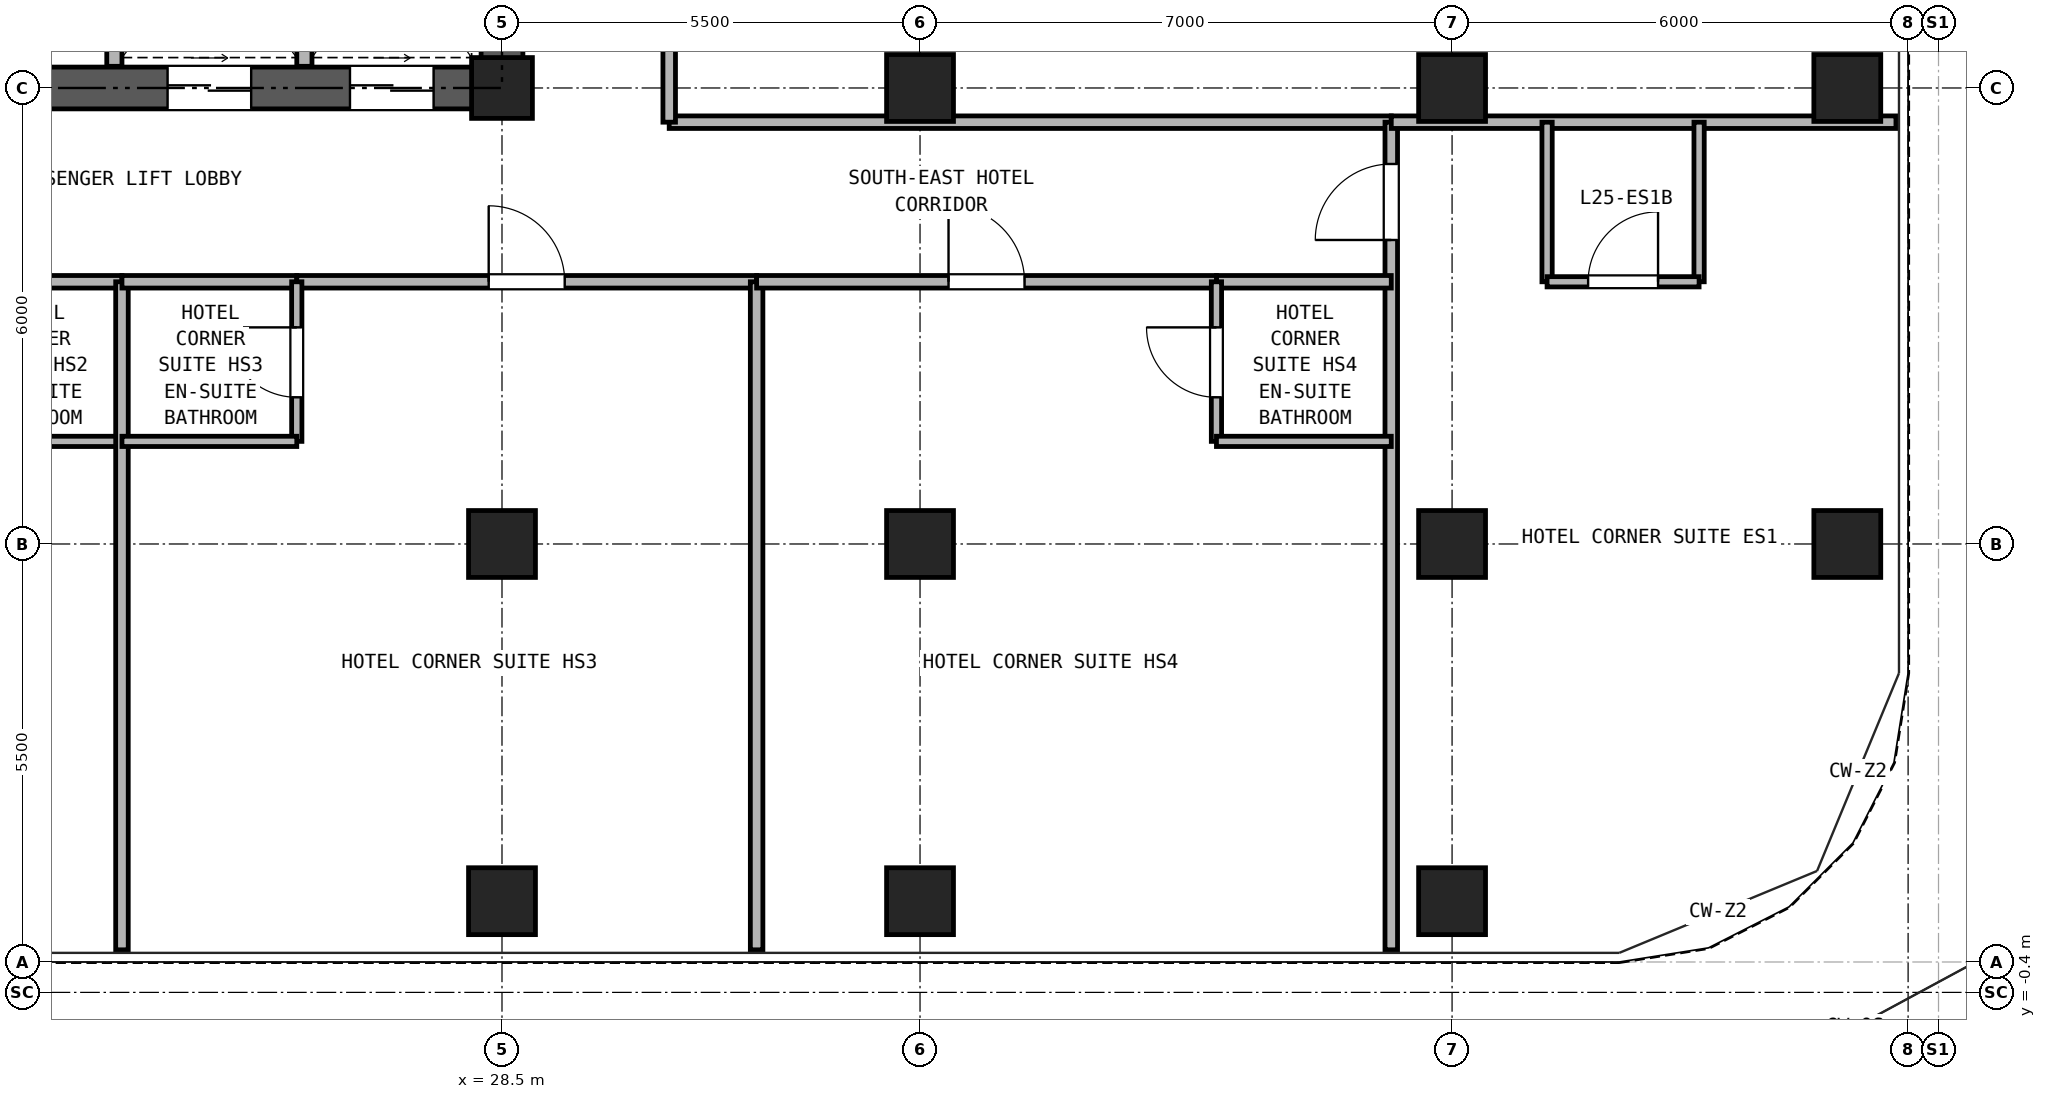
"""IFC4 building model, lengths in metres.
Left out: names, types, materials, properties, quantities, classifications, styles, units other than length and angle.
Written with IfcOpenShell. Run it as: python <this file> out.ifc"""

import sys

from ifc_helpers import new_model, si_unit, direction, frame, frame_2d, origin, origin_2d, place, context, subcontext, project, spatial, rectangle, hollow_rectangle, extrude, source, transform, mapped, element, fill, save


model = new_model("IFC4")
c1 = context("Model", 3, precision=1e-05, world=origin(), true_north=direction((0.0, 1.0)))
c2 = subcontext(c1, "Body", "Model", "MODEL_VIEW")
j1 = project(units=[si_unit("LENGTHUNIT", "METRE"), si_unit("PLANEANGLEUNIT", "RADIAN")], contexts=[c1])
p1 = place(None, origin())
s1 = spatial("IfcSite", under=j1, at=p1, CompositionType="ELEMENT")
p2 = place(p1, origin())
s2 = spatial("IfcBuilding", under=s1, at=p2, CompositionType="ELEMENT")
p3 = place(p2, frame((0.0, 0.0, 95.9)))
s3 = spatial("IfcBuildingStorey", under=s2, at=p3, CompositionType="ELEMENT", Elevation=95.9)
m1 = source(origin(), c2, "Body", "SweptSolid", [
    extrude(hollow_rectangle(XDim=0.88, YDim=0.88, WallThickness=0.05, at=origin_2d()), origin(), (0.0, 0.0, 1.0), 2.95),
])
for number, where, z_axis, x_axis in (
    (1, (28.5, 0.8, 0.0), (0.0, 0.0, 1.0), (1.0, 0.0, 0.0)),
    (2, (34.0, 0.8, 0.0), (0.0, 0.0, 1.0), (1.0, 0.0, 0.0)),
    (3, (41.0, 0.8, 0.0), (0.0, 0.0, 1.0), (1.0, 0.0, 0.0)),
    (4, (46.2, 5.5, 0.0), (0.0, 0.0, 1.0), (1.0, 0.0, 0.0)),
    (5, (46.2, 11.5, 0.0), (0.0, 0.0, 1.0), (1.0, 0.0, 0.0)),
    (6, (28.5, 5.5, 0.0), (0.0, 0.0, 1.0), (1.0, 0.0, 0.0)),
):
    element("IfcColumn", number, at=place(p3, frame(where, z_axis=z_axis, x_axis=x_axis)), inside=s3, PredefinedType="COLUMN", context=c2, shape_type="MappedRepresentation", body=[
        mapped(m1, transform((0.0, 0.0, 0.0), x_axis=(1.0, 0.0, 0.0), y_axis=(0.0, 1.0, 0.0), z_axis=(0.0, 0.0, 1.0), scale=1.0)),
    ])
m2 = source(origin(), c2, "Body", "SweptSolid", [
    extrude(hollow_rectangle(XDim=0.8, YDim=0.8, WallThickness=0.045, at=origin_2d()), origin(), (0.0, 0.0, 1.0), 2.95),
])
p4 = place(p3, frame((28.5, 11.5, 0.0), z_axis=(0.0, 0.0, 1.0), x_axis=(1.0, 0.0, 0.0)))
e7 = element("IfcColumn", 7, at=p4, inside=s3, PredefinedType="COLUMN", context=c2, shape_type="MappedRepresentation", body=[
    mapped(m2, transform((0.0, 0.0, 0.0), x_axis=(1.0, 0.0, 0.0), y_axis=(0.0, 1.0, 0.0), z_axis=(0.0, 0.0, 1.0), scale=1.0)),
])
for number, where, z_axis, x_axis in (
    (8, (34.0, 5.5, 0.0), (0.0, 0.0, 1.0), (1.0, 0.0, 0.0)),
    (9, (34.0, 11.5, 0.0), (0.0, 0.0, 1.0), (1.0, 0.0, 0.0)),
    (10, (41.0, 5.5, 0.0), (0.0, 0.0, 1.0), (1.0, 0.0, 0.0)),
    (11, (41.0, 11.5, 0.0), (0.0, 0.0, 1.0), (1.0, 0.0, 0.0)),
):
    element("IfcColumn", number, at=place(p3, frame(where, z_axis=z_axis, x_axis=x_axis)), inside=s3, PredefinedType="COLUMN", context=c2, shape_type="MappedRepresentation", body=[
        mapped(m1, transform((0.0, 0.0, 0.0), x_axis=(1.0, 0.0, 0.0), y_axis=(0.0, 1.0, 0.0), z_axis=(0.0, 0.0, 1.0), scale=1.0)),
    ])
p5 = place(p3, frame((18.225, 11.5, 0.0), z_axis=(0.0, 0.0, 1.0), x_axis=(1.0, 0.0, 0.0)))
e12 = element("IfcWall", 12, at=p5, inside=s3, PredefinedType="SHEAR", context=c2, shape_type="SweptSolid", body=[
    extrude(rectangle(XDim=10.55, YDim=0.55, at=frame_2d((5.275, 0.0))), origin(), (0.0, 0.0, 1.0), 2.95),
])
p6 = place(p5, frame((2.375, 0.0, 0.0)))
e13 = element("IfcOpeningElement", 13, at=p6, cuts=e12, PredefinedType="OPENING", context=c2, shape_type="SweptSolid", body=[
    extrude(rectangle(XDim=0.95, YDim=2.15, at=frame_2d((0.475, 1.075))), frame((0.0, 0.285, 0.0), z_axis=(0.0, -1.0, 0.0), x_axis=(1.0, 0.0, 0.0)), (0.0, 0.0, 1.0), 0.57),
])
p7 = place(p5, frame((5.875, 0.0, 0.0)))
e14 = element("IfcOpeningElement", 14, at=p7, cuts=e12, PredefinedType="OPENING", context=c2, shape_type="SweptSolid", body=[
    extrude(rectangle(XDim=1.1, YDim=2.25, at=frame_2d((0.55, 1.125))), frame((0.0, 0.285, 0.0), z_axis=(0.0, -1.0, 0.0), x_axis=(1.0, 0.0, 0.0)), (0.0, 0.0, 1.0), 0.57),
])
p8 = place(p5, frame((8.275, 0.0, 0.0)))
e15 = element("IfcOpeningElement", 15, at=p8, cuts=e12, PredefinedType="OPENING", context=c2, shape_type="SweptSolid", body=[
    extrude(rectangle(XDim=1.1, YDim=2.25, at=frame_2d((0.55, 1.125))), frame((0.0, 0.285, 0.0), z_axis=(0.0, -1.0, 0.0), x_axis=(1.0, 0.0, 0.0)), (0.0, 0.0, 1.0), 0.57),
])
p9 = place(p3, frame((28.5, 11.775, 0.0), z_axis=(0.0, 0.0, 1.0), x_axis=(0.0, 1.0, 0.0)))
e16 = element("IfcWall", 16, at=p9, inside=s3, PredefinedType="SHEAR", context=c2, shape_type="SweptSolid", body=[
    extrude(rectangle(XDim=16.7, YDim=0.55, at=frame_2d((8.35, 0.0))), origin(), (0.0, 0.0, 1.0), 2.95),
])
p10 = place(p9, frame((7.375, 0.0, 0.0)))
e17 = element("IfcOpeningElement", 17, at=p10, cuts=e16, PredefinedType="OPENING", context=c2, shape_type="SweptSolid", body=[
    extrude(rectangle(XDim=1.15, YDim=2.2, at=frame_2d((0.575, 1.1))), frame((0.0, 0.285, 0.0), z_axis=(0.0, -1.0, 0.0), x_axis=(1.0, 0.0, 0.0)), (0.0, 0.0, 1.0), 0.57),
])
for number, where, z_axis, x_axis in (
    (18, (23.4, 11.785, 0.0), (0.0, 0.0, 1.0), (0.0, 1.0, 0.0)),
    (19, (25.9, 11.785, 0.0), (0.0, 0.0, 1.0), (0.0, 1.0, 0.0)),
):
    element("IfcWall", number, at=place(p3, frame(where, z_axis=z_axis, x_axis=x_axis)), inside=s3, PredefinedType="PARTITIONING", context=c2, shape_type="SweptSolid", body=[
        extrude(rectangle(XDim=3.215, YDim=0.2, at=frame_2d((1.607, 0.0))), origin(), (0.0, 0.0, 1.0), 2.95),
    ])
p11 = place(p3, frame((30.7, 11.05, 0.0), z_axis=(0.0, 0.0, 1.0), x_axis=(1.0, 0.0, 0.0)))
e20 = element("IfcWall", 20, at=p11, inside=s3, PredefinedType="PARTITIONING", context=c2, shape_type="SweptSolid", body=[
    extrude(rectangle(XDim=9.5, YDim=0.165, at=frame_2d((4.75, 0.0))), origin(), (0.0, 0.0, 1.0), 2.95),
])
p12 = place(p3, frame((30.7, 11.05, 0.0), z_axis=(0.0, 0.0, 1.0), x_axis=(0.0, 1.0, 0.0)))
e21 = element("IfcWall", 21, at=p12, inside=s3, PredefinedType="PARTITIONING", context=c2, shape_type="SweptSolid", body=[
    extrude(rectangle(XDim=18.25, YDim=0.165, at=frame_2d((9.125, 0.0))), origin(), (0.0, 0.0, 1.0), 2.95),
])
p13 = place(p12, frame((8.625, 0.0, 0.0)))
e22 = element("IfcOpeningElement", 22, at=p13, cuts=e21, PredefinedType="OPENING", context=c2, shape_type="SweptSolid", body=[
    extrude(rectangle(XDim=0.95, YDim=2.15, at=frame_2d((0.475, 1.075))), frame((0.0, 0.093, 0.0), z_axis=(0.0, -1.0, 0.0), x_axis=(1.0, 0.0, 0.0)), (0.0, 0.0, 1.0), 0.185),
])
p14 = place(p3, frame((40.2, 0.16, 0.0), z_axis=(0.0, 0.0, 1.0), x_axis=(0.0, 1.0, 0.0)))
e23 = element("IfcWall", 23, at=p14, inside=s3, PredefinedType="PARTITIONING", context=c2, shape_type="SweptSolid", body=[
    extrude(rectangle(XDim=10.89, YDim=0.165, at=frame_2d((5.445, 0.0))), origin(), (0.0, 0.0, 1.0), 2.95),
])
p15 = place(p14, frame((9.34, 0.0, 0.0)))
e24 = element("IfcOpeningElement", 24, at=p15, cuts=e23, PredefinedType="OPENING", context=c2, shape_type="SweptSolid", body=[
    extrude(rectangle(XDim=1.0, YDim=2.15, at=frame_2d((0.5, 1.075))), frame((0.0, 0.093, 0.0), z_axis=(0.0, -1.0, 0.0), x_axis=(1.0, 0.0, 0.0)), (0.0, 0.0, 1.0), 0.185),
])
p16 = place(p3, frame((40.2, 11.05, 0.0), z_axis=(0.0, 0.0, 1.0), x_axis=(1.0, 0.0, 0.0)))
e25 = element("IfcWall", 25, at=p16, inside=s3, PredefinedType="PARTITIONING", context=c2, shape_type="SweptSolid", body=[
    extrude(rectangle(XDim=6.64, YDim=0.165, at=frame_2d((3.32, 0.0))), origin(), (0.0, 0.0, 1.0), 2.95),
])
for number, where, z_axis, x_axis in (
    (26, (42.25, 8.95, 0.0), (0.0, 0.0, 1.0), (0.0, 1.0, 0.0)),
    (27, (44.25, 8.95, 0.0), (0.0, 0.0, 1.0), (0.0, 1.0, 0.0)),
):
    element("IfcWall", number, at=place(p3, frame(where, z_axis=z_axis, x_axis=x_axis)), inside=s3, PredefinedType="PARTITIONING", context=c2, shape_type="SweptSolid", body=[
        extrude(rectangle(XDim=2.1, YDim=0.135, at=frame_2d((1.05, 0.0))), origin(), (0.0, 0.0, 1.0), 2.95),
    ])
p17 = place(p3, frame((42.25, 8.95, 0.0), z_axis=(0.0, 0.0, 1.0), x_axis=(1.0, 0.0, 0.0)))
e28 = element("IfcWall", 28, at=p17, inside=s3, PredefinedType="PARTITIONING", context=c2, shape_type="SweptSolid", body=[
    extrude(rectangle(XDim=2.0, YDim=0.135, at=frame_2d((1.0, 0.0))), origin(), (0.0, 0.0, 1.0), 2.95),
])
p18 = place(p17, frame((0.54, 0.0, 0.0)))
e29 = element("IfcOpeningElement", 29, at=p18, cuts=e28, PredefinedType="OPENING", context=c2, shape_type="SweptSolid", body=[
    extrude(rectangle(XDim=0.92, YDim=2.1, at=frame_2d((0.46, 1.05))), frame((0.0, 0.077, 0.0), z_axis=(0.0, -1.0, 0.0), x_axis=(1.0, 0.0, 0.0)), (0.0, 0.0, 1.0), 0.155),
])
p19 = place(p3, frame((21.2, 8.95, 0.0), z_axis=(0.0, 0.0, 1.0), x_axis=(1.0, 0.0, 0.0)))
e30 = element("IfcWall", 30, at=p19, inside=s3, PredefinedType="PARTITIONING", context=c2, shape_type="SweptSolid", body=[
    extrude(rectangle(XDim=2.3, YDim=0.165, at=frame_2d((1.15, 0.0))), origin(), (0.0, 0.0, 1.0), 2.95),
])
p20 = place(p3, frame((21.2, 6.85, 0.0), z_axis=(0.0, 0.0, 1.0), x_axis=(1.0, 0.0, 0.0)))
e31 = element("IfcWall", 31, at=p20, inside=s3, PredefinedType="PARTITIONING", context=c2, shape_type="SweptSolid", body=[
    extrude(rectangle(XDim=2.3, YDim=0.135, at=frame_2d((1.15, 0.0))), origin(), (0.0, 0.0, 1.0), 2.95),
])
p21 = place(p3, frame((23.5, 0.16, 0.0), z_axis=(0.0, 0.0, 1.0), x_axis=(0.0, 1.0, 0.0)))
e32 = element("IfcWall", 32, at=p21, inside=s3, PredefinedType="PARTITIONING", context=c2, shape_type="SweptSolid", body=[
    extrude(rectangle(XDim=8.79, YDim=0.165, at=frame_2d((4.395, 0.0))), origin(), (0.0, 0.0, 1.0), 2.95),
])
p22 = place(p3, frame((23.5, 8.95, 0.0), z_axis=(0.0, 0.0, 1.0), x_axis=(1.0, 0.0, 0.0)))
e33 = element("IfcWall", 33, at=p22, inside=s3, PredefinedType="PARTITIONING", context=c2, shape_type="SweptSolid", body=[
    extrude(rectangle(XDim=2.3, YDim=0.165, at=frame_2d((1.15, 0.0))), origin(), (0.0, 0.0, 1.0), 2.95),
])
p23 = place(p3, frame((25.8, 8.95, 0.0), z_axis=(0.0, 0.0, 1.0), x_axis=(1.0, 0.0, 0.0)))
e34 = element("IfcWall", 34, at=p23, inside=s3, PredefinedType="PARTITIONING", context=c2, shape_type="SweptSolid", body=[
    extrude(rectangle(XDim=6.05, YDim=0.165, at=frame_2d((3.025, 0.0))), origin(), (0.0, 0.0, 1.0), 2.95),
])
p24 = place(p23, frame((2.525, 0.0, 0.0)))
e35 = element("IfcOpeningElement", 35, at=p24, cuts=e34, PredefinedType="OPENING", context=c2, shape_type="SweptSolid", body=[
    extrude(rectangle(XDim=1.0, YDim=2.15, at=frame_2d((0.5, 1.075))), frame((0.0, 0.093, 0.0), z_axis=(0.0, -1.0, 0.0), x_axis=(1.0, 0.0, 0.0)), (0.0, 0.0, 1.0), 0.185),
])
p25 = place(p3, frame((25.8, 6.85, 0.0), z_axis=(0.0, 0.0, 1.0), x_axis=(0.0, 1.0, 0.0)))
e36 = element("IfcWall", 36, at=p25, inside=s3, PredefinedType="PARTITIONING", context=c2, shape_type="SweptSolid", body=[
    extrude(rectangle(XDim=2.1, YDim=0.135, at=frame_2d((1.05, 0.0))), origin(), (0.0, 0.0, 1.0), 2.95),
])
p26 = place(p25, frame((0.58, 0.0, 0.0)))
e37 = element("IfcOpeningElement", 37, at=p26, cuts=e36, PredefinedType="OPENING", context=c2, shape_type="SweptSolid", body=[
    extrude(rectangle(XDim=0.92, YDim=2.1, at=frame_2d((0.46, 1.05))), frame((0.0, 0.077, 0.0), z_axis=(0.0, -1.0, 0.0), x_axis=(1.0, 0.0, 0.0)), (0.0, 0.0, 1.0), 0.155),
])
p27 = place(p3, frame((23.5, 6.85, 0.0), z_axis=(0.0, 0.0, 1.0), x_axis=(1.0, 0.0, 0.0)))
e38 = element("IfcWall", 38, at=p27, inside=s3, PredefinedType="PARTITIONING", context=c2, shape_type="SweptSolid", body=[
    extrude(rectangle(XDim=2.3, YDim=0.135, at=frame_2d((1.15, 0.0))), origin(), (0.0, 0.0, 1.0), 2.95),
])
p28 = place(p3, frame((31.85, 0.16, 0.0), z_axis=(0.0, 0.0, 1.0), x_axis=(0.0, 1.0, 0.0)))
e39 = element("IfcWall", 39, at=p28, inside=s3, PredefinedType="PARTITIONING", context=c2, shape_type="SweptSolid", body=[
    extrude(rectangle(XDim=8.79, YDim=0.165, at=frame_2d((4.395, 0.0))), origin(), (0.0, 0.0, 1.0), 2.95),
])
p29 = place(p3, frame((37.9, 8.95, 0.0), z_axis=(0.0, 0.0, 1.0), x_axis=(1.0, 0.0, 0.0)))
e40 = element("IfcWall", 40, at=p29, inside=s3, PredefinedType="PARTITIONING", context=c2, shape_type="SweptSolid", body=[
    extrude(rectangle(XDim=2.3, YDim=0.165, at=frame_2d((1.15, 0.0))), origin(), (0.0, 0.0, 1.0), 2.95),
])
p30 = place(p3, frame((31.85, 8.95, 0.0), z_axis=(0.0, 0.0, 1.0), x_axis=(1.0, 0.0, 0.0)))
e41 = element("IfcWall", 41, at=p30, inside=s3, PredefinedType="PARTITIONING", context=c2, shape_type="SweptSolid", body=[
    extrude(rectangle(XDim=6.05, YDim=0.165, at=frame_2d((3.025, 0.0))), origin(), (0.0, 0.0, 1.0), 2.95),
])
p31 = place(p30, frame((2.525, 0.0, 0.0)))
e42 = element("IfcOpeningElement", 42, at=p31, cuts=e41, PredefinedType="OPENING", context=c2, shape_type="SweptSolid", body=[
    extrude(rectangle(XDim=1.0, YDim=2.15, at=frame_2d((0.5, 1.075))), frame((0.0, 0.093, 0.0), z_axis=(0.0, -1.0, 0.0), x_axis=(1.0, 0.0, 0.0)), (0.0, 0.0, 1.0), 0.185),
])
p32 = place(p3, frame((37.9, 6.85, 0.0), z_axis=(0.0, 0.0, 1.0), x_axis=(0.0, 1.0, 0.0)))
e43 = element("IfcWall", 43, at=p32, inside=s3, PredefinedType="PARTITIONING", context=c2, shape_type="SweptSolid", body=[
    extrude(rectangle(XDim=2.1, YDim=0.135, at=frame_2d((1.05, 0.0))), origin(), (0.0, 0.0, 1.0), 2.95),
])
p33 = place(p32, frame((0.58, 0.0, 0.0)))
e44 = element("IfcOpeningElement", 44, at=p33, cuts=e43, PredefinedType="OPENING", context=c2, shape_type="SweptSolid", body=[
    extrude(rectangle(XDim=0.92, YDim=2.1, at=frame_2d((0.46, 1.05))), frame((0.0, 0.077, 0.0), z_axis=(0.0, -1.0, 0.0), x_axis=(1.0, 0.0, 0.0)), (0.0, 0.0, 1.0), 0.155),
])
p34 = place(p3, frame((37.9, 6.85, 0.0), z_axis=(0.0, 0.0, 1.0), x_axis=(1.0, 0.0, 0.0)))
e45 = element("IfcWall", 45, at=p34, inside=s3, PredefinedType="PARTITIONING", context=c2, shape_type="SweptSolid", body=[
    extrude(rectangle(XDim=2.3, YDim=0.135, at=frame_2d((1.15, 0.0))), origin(), (0.0, 0.0, 1.0), 2.95),
])
p35 = place(p7, frame((1.1, 0.0, 0.0), z_axis=(0.0, 0.0, 1.0), x_axis=(-1.0, 0.0, 0.0)))
e46 = element("IfcDoor", 46, at=p35, inside=s3, OperationType="DOUBLE_DOOR_SLIDING", PredefinedType="DOOR", context=c2, shape_type="SweptSolid", body=[
    extrude(rectangle(XDim=1.1, YDim=2.25, at=frame_2d((0.55, 1.125))), frame((0.0, 0.025, 0.0), z_axis=(0.0, -1.0, 0.0), x_axis=(1.0, 0.0, 0.0)), (0.0, 0.0, 1.0), 0.05),
])
fill(e14, e46)
p36 = place(p8, frame((1.1, 0.0, 0.0), z_axis=(0.0, 0.0, 1.0), x_axis=(-1.0, 0.0, 0.0)))
e47 = element("IfcDoor", 47, at=p36, inside=s3, OperationType="DOUBLE_DOOR_SLIDING", PredefinedType="DOOR", context=c2, shape_type="SweptSolid", body=[
    extrude(rectangle(XDim=1.1, YDim=2.25, at=frame_2d((0.55, 1.125))), frame((0.0, 0.025, 0.0), z_axis=(0.0, -1.0, 0.0), x_axis=(1.0, 0.0, 0.0)), (0.0, 0.0, 1.0), 0.05),
])
fill(e15, e47)
p37 = place(p18, origin())
e48 = element("IfcDoor", 48, at=p37, inside=s3, OperationType="SINGLE_SWING_RIGHT", PredefinedType="DOOR", context=c2, shape_type="SweptSolid", body=[
    extrude(rectangle(XDim=0.92, YDim=2.1, at=frame_2d((0.46, 1.05))), frame((0.0, 0.025, 0.0), z_axis=(0.0, -1.0, 0.0), x_axis=(1.0, 0.0, 0.0)), (0.0, 0.0, 1.0), 0.05),
])
fill(e29, e48)
p38 = place(p15, frame((1.0, 0.0, 0.0), z_axis=(0.0, 0.0, 1.0), x_axis=(-1.0, 0.0, 0.0)))
e49 = element("IfcDoor", 49, at=p38, inside=s3, OperationType="SINGLE_SWING_LEFT", PredefinedType="DOOR", context=c2, shape_type="SweptSolid", body=[
    extrude(rectangle(XDim=1.0, YDim=2.15, at=frame_2d((0.5, 1.075))), frame((0.0, 0.025, 0.0), z_axis=(0.0, -1.0, 0.0), x_axis=(1.0, 0.0, 0.0)), (0.0, 0.0, 1.0), 0.05),
])
fill(e24, e49)
p39 = place(p26, frame((0.92, 0.0, 0.0), z_axis=(0.0, 0.0, 1.0), x_axis=(-1.0, 0.0, 0.0)))
e50 = element("IfcDoor", 50, at=p39, inside=s3, OperationType="SINGLE_SWING_RIGHT", PredefinedType="DOOR", context=c2, shape_type="SweptSolid", body=[
    extrude(rectangle(XDim=0.92, YDim=2.1, at=frame_2d((0.46, 1.05))), frame((0.0, 0.025, 0.0), z_axis=(0.0, -1.0, 0.0), x_axis=(1.0, 0.0, 0.0)), (0.0, 0.0, 1.0), 0.05),
])
fill(e37, e50)
p40 = place(p24, frame((1.0, 0.0, 0.0), z_axis=(0.0, 0.0, 1.0), x_axis=(-1.0, 0.0, 0.0)))
e51 = element("IfcDoor", 51, at=p40, inside=s3, OperationType="SINGLE_SWING_LEFT", PredefinedType="DOOR", context=c2, shape_type="SweptSolid", body=[
    extrude(rectangle(XDim=1.0, YDim=2.15, at=frame_2d((0.5, 1.075))), frame((0.0, 0.025, 0.0), z_axis=(0.0, -1.0, 0.0), x_axis=(1.0, 0.0, 0.0)), (0.0, 0.0, 1.0), 0.05),
])
fill(e35, e51)
p41 = place(p33, origin())
e52 = element("IfcDoor", 52, at=p41, inside=s3, OperationType="SINGLE_SWING_RIGHT", PredefinedType="DOOR", context=c2, shape_type="SweptSolid", body=[
    extrude(rectangle(XDim=0.92, YDim=2.1, at=frame_2d((0.46, 1.05))), frame((0.0, 0.025, 0.0), z_axis=(0.0, -1.0, 0.0), x_axis=(1.0, 0.0, 0.0)), (0.0, 0.0, 1.0), 0.05),
])
fill(e44, e52)
p42 = place(p31, frame((1.0, 0.0, 0.0), z_axis=(0.0, 0.0, 1.0), x_axis=(-1.0, 0.0, 0.0)))
e53 = element("IfcDoor", 53, at=p42, inside=s3, OperationType="SINGLE_SWING_LEFT", PredefinedType="DOOR", context=c2, shape_type="SweptSolid", body=[
    extrude(rectangle(XDim=1.0, YDim=2.15, at=frame_2d((0.5, 1.075))), frame((0.0, 0.025, 0.0), z_axis=(0.0, -1.0, 0.0), x_axis=(1.0, 0.0, 0.0)), (0.0, 0.0, 1.0), 0.05),
])
fill(e42, e53)
save(model, sys.argv[1])
